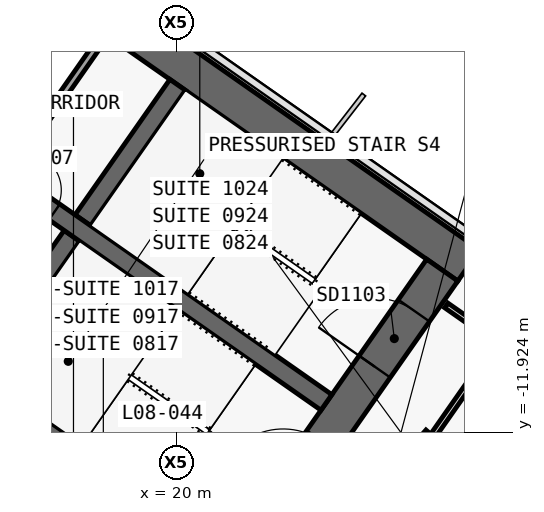
"""IFC4 building model, lengths in metres.
Left out: names, types, materials, properties, quantities, classifications, styles, units other than length and angle.
Written with IfcOpenShell. Run it as: python <this file> out.ifc"""

import sys

from ifc_helpers import new_model, si_unit, direction, frame, frame_2d, origin, place, context, subcontext, project, spatial, polyline, rectangle, outline, extrude, element, fill, save


model = new_model("IFC4")
c1 = context("Model", 3, precision=1e-05, world=origin(), true_north=direction((0.0, 1.0)))
c2 = subcontext(c1, "Body", "Model", "MODEL_VIEW")
j1 = project(units=[si_unit("LENGTHUNIT", "METRE"), si_unit("PLANEANGLEUNIT", "RADIAN")], contexts=[c1])
p1 = place(None, origin())
s1 = spatial("IfcSite", under=j1, at=p1, CompositionType="ELEMENT")
p2 = place(p1, origin())
s2 = spatial("IfcBuilding", under=s1, at=p2, CompositionType="ELEMENT")
p3 = place(p2, frame((0.0, 0.0, 54.5)))
s3 = spatial("IfcBuildingStorey", under=s2, at=p3, CompositionType="ELEMENT", Elevation=54.5)
p4 = place(p3, frame((-0.037, 11.867, 0.0), z_axis=(0.0, 0.0, 1.0), x_axis=(0.819155306259, -0.573571777746, 0.0)))
e1 = element("IfcWall", 1, at=p4, inside=s3, PredefinedType="SHEAR", context=c2, shape_type="SweptSolid", body=[
    extrude(outline(polyline([(33.837, 0.5), (0.0, 0.5), (0.7, -0.5), (33.837, -0.5), (33.837, 0.5)])), origin(), (0.0, 0.0, 1.0), 3.6),
])
p5 = place(p3, frame((-0.037, -0.585, 0.0), z_axis=(0.0, 0.0, 1.0), x_axis=(0.819157152511, -0.573569140985, 0.0)))
e2 = element("IfcWall", 2, at=p5, inside=s3, PredefinedType="SHEAR", context=c2, shape_type="SweptSolid", body=[
    extrude(outline(polyline([(26.695, 0.5), (0.0, 0.5), (0.7, -0.5), (26.695, -0.5), (26.695, 0.5)])), origin(), (0.0, 0.0, 1.0), 3.6),
])
p6 = place(p5, frame((6.695, 0.0, 0.0)))
e3 = element("IfcOpeningElement", 3, at=p6, cuts=e2, PredefinedType="OPENING", context=c2, shape_type="SweptSolid", body=[
    extrude(rectangle(XDim=1.5, YDim=2.1, at=frame_2d((0.75, 1.05))), frame((0.0, 0.51, 0.0), z_axis=(0.0, -1.0, 0.0), x_axis=(1.0, 0.0, 0.0)), (0.0, 0.0, 1.0), 1.02),
])
p7 = place(p5, frame((12.445, 0.0, 0.0)))
e4 = element("IfcOpeningElement", 4, at=p7, cuts=e2, PredefinedType="OPENING", context=c2, shape_type="SweptSolid", body=[
    extrude(rectangle(XDim=1.5, YDim=2.1, at=frame_2d((0.75, 1.05))), frame((0.0, 0.51, 0.0), z_axis=(0.0, -1.0, 0.0), x_axis=(1.0, 0.0, 0.0)), (0.0, 0.0, 1.0), 1.02),
])
p8 = place(p3, frame((21.708, -15.2, 0.0), z_axis=(0.0, 0.0, 1.0), x_axis=(0.573576324356, 0.819152122709, 0.0)))
e5 = element("IfcWall", 5, at=p8, inside=s3, PredefinedType="SHEAR", context=c2, shape_type="SweptSolid", body=[
    extrude(outline(polyline([(9.2, 0.5), (0.0, 0.5), (0.0, -0.5), (9.2, -0.5), (9.2, 0.5)])), origin(), (0.0, 0.0, 1.0), 3.6),
])
p9 = place(p8, frame((6.1, 0.0, 0.0)))
e6 = element("IfcOpeningElement", 6, at=p9, cuts=e5, PredefinedType="OPENING", context=c2, shape_type="SweptSolid", body=[
    extrude(rectangle(XDim=1.8, YDim=2.1, at=frame_2d((0.9, 1.05))), frame((0.0, 0.51, 0.0), z_axis=(0.0, -1.0, 0.0), x_axis=(1.0, 0.0, 0.0)), (0.0, 0.0, 1.0), 1.02),
])
p10 = place(p8, frame((1.9, 0.0, 0.0)))
e7 = element("IfcOpeningElement", 7, at=p10, cuts=e5, PredefinedType="OPENING", context=c2, shape_type="SweptSolid", body=[
    extrude(rectangle(XDim=1.8, YDim=2.1, at=frame_2d((0.9, 1.05))), frame((0.0, 0.51, 0.0), z_axis=(0.0, -1.0, 0.0), x_axis=(1.0, 0.0, 0.0)), (0.0, 0.0, 1.0), 1.02),
])
p11 = place(p3, frame((14.745, -10.324, 0.0), z_axis=(0.0, 0.0, 1.0), x_axis=(0.57356780395, 0.819158088694, 0.0)))
e8 = element("IfcWall", 8, at=p11, inside=s3, PredefinedType="SHEAR", context=c2, shape_type="SweptSolid", body=[
    extrude(outline(polyline([(0.0, 0.25), (0.0, -0.25), (4.35, -0.25), (4.35, 0.25), (0.0, 0.25)])), origin(), (0.0, 0.0, 1.0), 3.6),
])
p12 = place(p3, frame((17.527, -6.352, 0.0), z_axis=(0.0, 0.0, 1.0), x_axis=(0.573530143085, 0.819184457233, 0.0)))
e9 = element("IfcWall", 9, at=p12, inside=s3, PredefinedType="SHEAR", context=c2, shape_type="SweptSolid", body=[
    extrude(outline(polyline([(4.35, -0.25), (4.35, 0.25), (0.0, 0.25), (0.0, -0.25), (4.35, -0.25)])), origin(), (0.0, 0.0, 1.0), 3.6),
])
p13 = place(p3, frame((2.638, 3.768, 0.0), z_axis=(0.0, 0.0, 1.0), x_axis=(0.819148977158, -0.573580816643, 0.0)))
e10 = element("IfcWall", 10, at=p13, inside=s3, PredefinedType="SHEAR", context=c2, shape_type="SweptSolid", body=[
    extrude(outline(polyline([(0.0, 0.25), (0.0, -0.25), (26.0, -0.25), (26.0, 0.25), (0.0, 0.25)])), origin(), (0.0, 0.0, 1.0), 3.6),
])
p14 = place(p13, frame((9.637, 0.0, 0.0)))
e11 = element("IfcOpeningElement", 11, at=p14, cuts=e10, PredefinedType="OPENING", context=c2, shape_type="SweptSolid", body=[
    extrude(rectangle(XDim=1.2, YDim=2.1, at=frame_2d((0.6, 1.05))), frame((0.0, 0.26, 0.0), z_axis=(0.0, -1.0, 0.0), x_axis=(1.0, 0.0, 0.0)), (0.0, 0.0, 1.0), 0.52),
])
p15 = place(p13, frame((11.812, 0.0, 0.0)))
e12 = element("IfcOpeningElement", 12, at=p15, cuts=e10, PredefinedType="OPENING", context=c2, shape_type="SweptSolid", body=[
    extrude(rectangle(XDim=1.2, YDim=2.1, at=frame_2d((0.6, 1.05))), frame((0.0, 0.26, 0.0), z_axis=(0.0, -1.0, 0.0), x_axis=(1.0, 0.0, 0.0)), (0.0, 0.0, 1.0), 0.52),
])
p16 = place(p13, frame((13.988, 0.0, 0.0)))
e13 = element("IfcOpeningElement", 13, at=p16, cuts=e10, PredefinedType="OPENING", context=c2, shape_type="SweptSolid", body=[
    extrude(rectangle(XDim=1.2, YDim=2.1, at=frame_2d((0.6, 1.05))), frame((0.0, 0.26, 0.0), z_axis=(0.0, -1.0, 0.0), x_axis=(1.0, 0.0, 0.0)), (0.0, 0.0, 1.0), 0.52),
])
p17 = place(p13, frame((16.262, 0.0, 0.0)))
e14 = element("IfcOpeningElement", 14, at=p17, cuts=e10, PredefinedType="OPENING", context=c2, shape_type="SweptSolid", body=[
    extrude(rectangle(XDim=1.0, YDim=2.1, at=frame_2d((0.5, 1.05))), frame((0.0, 0.26, 0.0), z_axis=(0.0, -1.0, 0.0), x_axis=(1.0, 0.0, 0.0)), (0.0, 0.0, 1.0), 0.52),
])
p18 = place(p3, frame((15.622, -5.018, 0.0), z_axis=(0.0, 0.0, 1.0), x_axis=(0.573594173421, 0.819139624372, 0.0)))
e15 = element("IfcWall", 15, at=p18, inside=s3, PredefinedType="SOLIDWALL", context=c2, shape_type="SweptSolid", body=[
    extrude(rectangle(XDim=4.35, YDim=0.2, at=frame_2d((2.175, 0.0))), origin(), (0.0, 0.0, 1.0), 3.6),
])
p19 = place(p3, frame((22.285, -16.825, 0.0), z_axis=(0.0, 0.0, 1.0), x_axis=(0.661551268245, 0.749899939647, 0.0)))
e16 = element("IfcWall", 16, at=p19, inside=s3, PredefinedType="PARTITIONING", context=c2, shape_type="SweptSolid", body=[
    extrude(rectangle(XDim=6.541, YDim=0.15, at=frame_2d((3.271, 0.0))), origin(), (0.0, 0.0, 1.0), 2.6),
])
p20 = place(p3, frame((26.746, -12.014, 0.0), z_axis=(0.0, 0.0, 1.0), x_axis=(0.573560650686, 0.819163097304, 0.0)))
e17 = element("IfcWall", 17, at=p20, inside=s3, PredefinedType="PARTITIONING", context=c2, shape_type="SweptSolid", body=[
    extrude(rectangle(XDim=3.0, YDim=0.15, at=frame_2d((1.5, 0.0))), origin(), (0.0, 0.0, 1.0), 3.32),
])
p21 = place(p3, frame((28.467, -9.556, 0.0), z_axis=(0.0, 0.0, 1.0), x_axis=(-0.819109000826, 0.573637903879, 0.0)))
e18 = element("IfcWall", 18, at=p21, inside=s3, PredefinedType="PARTITIONING", context=c2, shape_type="SweptSolid", body=[
    extrude(rectangle(XDim=1.68, YDim=0.15, at=frame_2d((0.84, 0.0))), origin(), (0.0, 0.0, 1.0), 3.32),
])
p22 = place(p17, origin())
e19 = element("IfcDoor", 19, at=p22, inside=s3, OperationType="SINGLE_SWING_RIGHT", PredefinedType="DOOR", context=c2, shape_type="SweptSolid", body=[
    extrude(rectangle(XDim=1.0, YDim=2.1, at=frame_2d((0.5, 1.05))), frame((0.0, 0.025, 0.0), z_axis=(0.0, -1.0, 0.0), x_axis=(1.0, 0.0, 0.0)), (0.0, 0.0, 1.0), 0.05),
])
fill(e14, e19)
p23 = place(p9, origin())
e20 = element("IfcDoor", 20, at=p23, inside=s3, OperationType="DOUBLE_DOOR_SINGLE_SWING", PredefinedType="DOOR", context=c2, shape_type="SweptSolid", body=[
    extrude(rectangle(XDim=1.8, YDim=2.1, at=frame_2d((0.9, 1.05))), frame((0.0, 0.025, 0.0), z_axis=(0.0, -1.0, 0.0), x_axis=(1.0, 0.0, 0.0)), (0.0, 0.0, 1.0), 0.05),
])
fill(e6, e20)
save(model, sys.argv[1])
